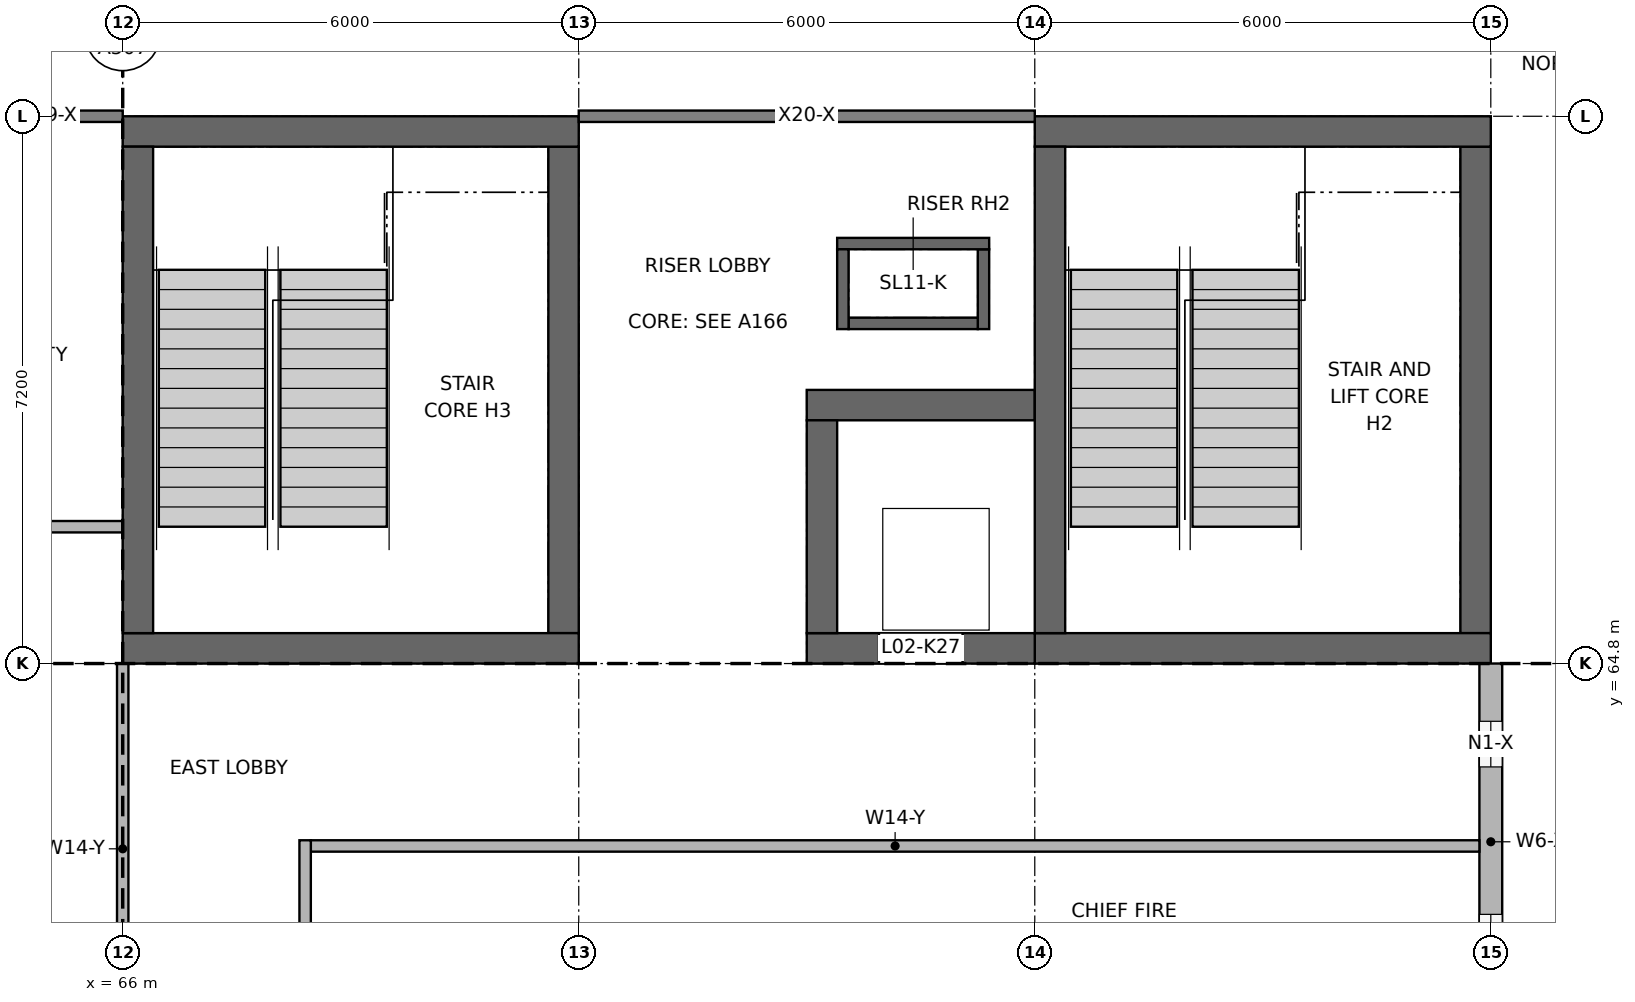
"""IFC4 building model, lengths in metres.
Left out: names, types, materials, properties, quantities, classifications, styles, units other than length and angle.
Written with IfcOpenShell. Run it as: python <this file> out.ifc"""

import sys

from ifc_helpers import new_model, si_unit, direction, frame, frame_2d, origin, place, context, subcontext, project, spatial, rectangle, extrude, element, fill, save


model = new_model("IFC4")
c1 = context("Model", 3, precision=1e-05, world=origin(), true_north=direction((0.0, 1.0)))
c2 = subcontext(c1, "Body", "Model", "MODEL_VIEW")
j1 = project(units=[si_unit("LENGTHUNIT", "METRE"), si_unit("PLANEANGLEUNIT", "RADIAN")], contexts=[c1])
p1 = place(None, origin())
s1 = spatial("IfcSite", under=j1, at=p1, CompositionType="ELEMENT")
p2 = place(p1, origin())
s2 = spatial("IfcBuilding", under=s1, at=p2, CompositionType="ELEMENT")
p3 = place(p2, frame((0.0, 0.0, 8.4)))
s3 = spatial("IfcBuildingStorey", under=s2, at=p3, CompositionType="ELEMENT", Elevation=8.4)
p4 = place(p3, frame((78.0, 65.0, 0.0), z_axis=(0.0, 0.0, 1.0), x_axis=(1.0, 0.0, 0.0)))
e1 = element("IfcWall", 1, at=p4, inside=s3, PredefinedType="SHEAR", context=c2, shape_type="SweptSolid", body=[
    extrude(rectangle(XDim=6.0, YDim=0.4, at=frame_2d((3.0, 0.0))), origin(), (0.0, 0.0, 1.0), 4.0),
])
p5 = place(p4, frame((2.4, 0.0, 0.0)))
e2 = element("IfcOpeningElement", 2, at=p5, cuts=e1, PredefinedType="OPENING", context=c2, shape_type="SweptSolid", body=[
    extrude(rectangle(XDim=1.2, YDim=2.1, at=frame_2d((0.6, 1.05))), frame((0.0, 0.21, 0.0), z_axis=(0.0, -1.0, 0.0), x_axis=(1.0, 0.0, 0.0)), (0.0, 0.0, 1.0), 0.42),
])
p6 = place(p3, frame((78.0, 71.8, 0.0), z_axis=(0.0, 0.0, 1.0), x_axis=(1.0, 0.0, 0.0)))
e3 = element("IfcWall", 3, at=p6, inside=s3, PredefinedType="SHEAR", context=c2, shape_type="SweptSolid", body=[
    extrude(rectangle(XDim=6.0, YDim=0.4, at=frame_2d((3.0, 0.0))), origin(), (0.0, 0.0, 1.0), 4.0),
])
p7 = place(p6, frame((3.7, 0.0, 0.0)))
e4 = element("IfcOpeningElement", 4, at=p7, cuts=e3, PredefinedType="OPENING", context=c2, shape_type="SweptSolid", body=[
    extrude(rectangle(XDim=1.4, YDim=2.1, at=frame_2d((0.7, 1.05))), frame((0.0, 0.21, 0.0), z_axis=(0.0, -1.0, 0.0), x_axis=(1.0, 0.0, 0.0)), (0.0, 0.0, 1.0), 0.42),
])
for number, where, z_axis, x_axis in (
    (5, (78.2, 65.2, 0.0), (0.0, 0.0, 1.0), (0.0, 1.0, 0.0)),
    (6, (83.8, 65.2, 0.0), (0.0, 0.0, 1.0), (0.0, 1.0, 0.0)),
):
    element("IfcWall", number, at=place(p3, frame(where, z_axis=z_axis, x_axis=x_axis)), inside=s3, PredefinedType="SHEAR", context=c2, shape_type="SweptSolid", body=[
        extrude(rectangle(XDim=6.4, YDim=0.4, at=frame_2d((3.2, 0.0))), origin(), (0.0, 0.0, 1.0), 4.0),
    ])
p8 = place(p3, frame((75.0, 65.0, 0.0), z_axis=(0.0, 0.0, 1.0), x_axis=(1.0, 0.0, 0.0)))
e7 = element("IfcWall", 7, at=p8, inside=s3, PredefinedType="SHEAR", context=c2, shape_type="SweptSolid", body=[
    extrude(rectangle(XDim=3.0, YDim=0.4, at=frame_2d((1.5, 0.0))), origin(), (0.0, 0.0, 1.0), 4.2),
])
p9 = place(p8, frame((0.95, 0.0, 0.0)))
e8 = element("IfcOpeningElement", 8, at=p9, cuts=e7, PredefinedType="OPENING", context=c2, shape_type="SweptSolid", body=[
    extrude(rectangle(XDim=1.1, YDim=2.1, at=frame_2d((0.55, 1.05))), frame((0.0, 0.21, 0.0), z_axis=(0.0, -1.0, 0.0), x_axis=(1.0, 0.0, 0.0)), (0.0, 0.0, 1.0), 0.42),
])
p10 = place(p3, frame((75.0, 68.2, 0.0), z_axis=(0.0, 0.0, 1.0), x_axis=(1.0, 0.0, 0.0)))
e9 = element("IfcWall", 9, at=p10, inside=s3, PredefinedType="SHEAR", context=c2, shape_type="SweptSolid", body=[
    extrude(rectangle(XDim=3.0, YDim=0.4, at=frame_2d((1.5, 0.0))), origin(), (0.0, 0.0, 1.0), 4.2),
])
p11 = place(p3, frame((75.2, 65.2, 0.0), z_axis=(0.0, 0.0, 1.0), x_axis=(0.0, 1.0, 0.0)))
e10 = element("IfcWall", 10, at=p11, inside=s3, PredefinedType="SHEAR", context=c2, shape_type="SweptSolid", body=[
    extrude(rectangle(XDim=2.8, YDim=0.4, at=frame_2d((1.4, 0.0))), origin(), (0.0, 0.0, 1.0), 4.2),
])
p12 = place(p3, frame((66.0, 65.0, 0.0), z_axis=(0.0, 0.0, 1.0), x_axis=(1.0, 0.0, 0.0)))
e11 = element("IfcWall", 11, at=p12, inside=s3, PredefinedType="SHEAR", context=c2, shape_type="SweptSolid", body=[
    extrude(rectangle(XDim=6.0, YDim=0.4, at=frame_2d((3.0, 0.0))), origin(), (0.0, 0.0, 1.0), 4.0),
])
p13 = place(p12, frame((2.4, 0.0, 0.0)))
e12 = element("IfcOpeningElement", 12, at=p13, cuts=e11, PredefinedType="OPENING", context=c2, shape_type="SweptSolid", body=[
    extrude(rectangle(XDim=1.2, YDim=2.1, at=frame_2d((0.6, 1.05))), frame((0.0, 0.21, 0.0), z_axis=(0.0, -1.0, 0.0), x_axis=(1.0, 0.0, 0.0)), (0.0, 0.0, 1.0), 0.42),
])
p14 = place(p3, frame((66.0, 71.8, 0.0), z_axis=(0.0, 0.0, 1.0), x_axis=(1.0, 0.0, 0.0)))
e13 = element("IfcWall", 13, at=p14, inside=s3, PredefinedType="SHEAR", context=c2, shape_type="SweptSolid", body=[
    extrude(rectangle(XDim=6.0, YDim=0.4, at=frame_2d((3.0, 0.0))), origin(), (0.0, 0.0, 1.0), 4.0),
])
p15 = place(p14, frame((3.7, 0.0, 0.0)))
e14 = element("IfcOpeningElement", 14, at=p15, cuts=e13, PredefinedType="OPENING", context=c2, shape_type="SweptSolid", body=[
    extrude(rectangle(XDim=1.4, YDim=2.1, at=frame_2d((0.7, 1.05))), frame((0.0, 0.21, 0.0), z_axis=(0.0, -1.0, 0.0), x_axis=(1.0, 0.0, 0.0)), (0.0, 0.0, 1.0), 0.42),
])
for number, where, z_axis, x_axis in (
    (15, (66.2, 65.2, 0.0), (0.0, 0.0, 1.0), (0.0, 1.0, 0.0)),
    (16, (71.8, 65.2, 0.0), (0.0, 0.0, 1.0), (0.0, 1.0, 0.0)),
):
    element("IfcWall", number, at=place(p3, frame(where, z_axis=z_axis, x_axis=x_axis)), inside=s3, PredefinedType="SHEAR", context=c2, shape_type="SweptSolid", body=[
        extrude(rectangle(XDim=6.4, YDim=0.4, at=frame_2d((3.2, 0.0))), origin(), (0.0, 0.0, 1.0), 4.0),
    ])
for number, where, z_axis, x_axis in (
    (17, (78.0, 65.0, -0.25), (0.0, 0.0, 1.0), (1.0, 0.0, 0.0)),
    (18, (78.0, 71.8, -0.25), (0.0, 0.0, 1.0), (1.0, 0.0, 0.0)),
):
    element("IfcWall", number, at=place(p3, frame(where, z_axis=z_axis, x_axis=x_axis)), inside=s3, PredefinedType="SOLIDWALL", context=c2, shape_type="SweptSolid", body=[
        extrude(rectangle(XDim=6.0, YDim=0.4, at=frame_2d((3.0, 0.0))), origin(), (0.0, 0.0, 1.0), 0.25),
    ])
p16 = place(p3, frame((83.8, 65.2, -0.25), z_axis=(0.0, 0.0, 1.0), x_axis=(0.0, 1.0, 0.0)))
e19 = element("IfcWall", 19, at=p16, inside=s3, PredefinedType="SOLIDWALL", context=c2, shape_type="SweptSolid", body=[
    extrude(rectangle(XDim=6.4, YDim=0.4, at=frame_2d((3.2, 0.0))), origin(), (0.0, 0.0, 1.0), 0.25),
])
for number, where, z_axis, x_axis in (
    (20, (66.0, 65.0, -0.25), (0.0, 0.0, 1.0), (1.0, 0.0, 0.0)),
    (21, (66.0, 71.8, -0.25), (0.0, 0.0, 1.0), (1.0, 0.0, 0.0)),
):
    element("IfcWall", number, at=place(p3, frame(where, z_axis=z_axis, x_axis=x_axis)), inside=s3, PredefinedType="SOLIDWALL", context=c2, shape_type="SweptSolid", body=[
        extrude(rectangle(XDim=6.0, YDim=0.4, at=frame_2d((3.0, 0.0))), origin(), (0.0, 0.0, 1.0), 0.25),
    ])
for number, where, z_axis, x_axis in (
    (22, (66.2, 65.2, -0.25), (0.0, 0.0, 1.0), (0.0, 1.0, 0.0)),
    (23, (71.8, 65.2, -0.25), (0.0, 0.0, 1.0), (0.0, 1.0, 0.0)),
):
    element("IfcWall", number, at=place(p3, frame(where, z_axis=z_axis, x_axis=x_axis)), inside=s3, PredefinedType="SOLIDWALL", context=c2, shape_type="SweptSolid", body=[
        extrude(rectangle(XDim=6.4, YDim=0.4, at=frame_2d((3.2, 0.0))), origin(), (0.0, 0.0, 1.0), 0.25),
    ])
p17 = place(p3, frame((75.4, 69.275, 0.0), z_axis=(0.0, 0.0, 1.0), x_axis=(1.0, 0.0, 0.0)))
e24 = element("IfcWall", 24, at=p17, inside=s3, PredefinedType="SOLIDWALL", context=c2, shape_type="SweptSolid", body=[
    extrude(rectangle(XDim=2.0, YDim=0.15, at=frame_2d((1.0, 0.0))), origin(), (0.0, 0.0, 1.0), 4.2),
])
p18 = place(p3, frame((75.4, 70.325, 0.0), z_axis=(0.0, 0.0, 1.0), x_axis=(1.0, 0.0, 0.0)))
e25 = element("IfcWall", 25, at=p18, inside=s3, PredefinedType="SOLIDWALL", context=c2, shape_type="SweptSolid", body=[
    extrude(rectangle(XDim=2.0, YDim=0.15, at=frame_2d((1.0, 0.0))), origin(), (0.0, 0.0, 1.0), 4.2),
])
p19 = place(p18, frame((0.6, 0.0, 0.0)))
e26 = element("IfcOpeningElement", 26, at=p19, cuts=e25, PredefinedType="OPENING", context=c2, shape_type="SweptSolid", body=[
    extrude(rectangle(XDim=0.8, YDim=2.1, at=frame_2d((0.4, 1.05))), frame((0.0, 0.085, 0.0), z_axis=(0.0, -1.0, 0.0), x_axis=(1.0, 0.0, 0.0)), (0.0, 0.0, 1.0), 0.17),
])
for number, where, z_axis, x_axis in (
    (27, (75.475, 69.35, 0.0), (0.0, 0.0, 1.0), (0.0, 1.0, 0.0)),
    (28, (77.325, 69.35, 0.0), (0.0, 0.0, 1.0), (0.0, 1.0, 0.0)),
):
    element("IfcWall", number, at=place(p3, frame(where, z_axis=z_axis, x_axis=x_axis)), inside=s3, PredefinedType="SOLIDWALL", context=c2, shape_type="SweptSolid", body=[
        extrude(rectangle(XDim=0.9, YDim=0.15, at=frame_2d((0.45, 0.0))), origin(), (0.0, 0.0, 1.0), 4.2),
    ])
p20 = place(p3, frame((75.55, 69.275, -0.25), z_axis=(0.0, 0.0, 1.0), x_axis=(1.0, 0.0, 0.0)))
e29 = element("IfcWall", 29, at=p20, inside=s3, PredefinedType="SOLIDWALL", context=c2, shape_type="SweptSolid", body=[
    extrude(rectangle(XDim=1.7, YDim=0.15, at=frame_2d((0.85, 0.0))), origin(), (0.0, 0.0, 1.0), 0.25),
])
p21 = place(p3, frame((75.4, 70.325, -0.25), z_axis=(0.0, 0.0, 1.0), x_axis=(1.0, 0.0, 0.0)))
e30 = element("IfcWall", 30, at=p21, inside=s3, PredefinedType="SOLIDWALL", context=c2, shape_type="SweptSolid", body=[
    extrude(rectangle(XDim=2.0, YDim=0.15, at=frame_2d((1.0, 0.0))), origin(), (0.0, 0.0, 1.0), 0.25),
])
for number, where, z_axis, x_axis in (
    (31, (75.475, 69.2, -0.25), (0.0, 0.0, 1.0), (0.0, 1.0, 0.0)),
    (32, (77.325, 69.2, -0.25), (0.0, 0.0, 1.0), (0.0, 1.0, 0.0)),
):
    element("IfcWall", number, at=place(p3, frame(where, z_axis=z_axis, x_axis=x_axis)), inside=s3, PredefinedType="SOLIDWALL", context=c2, shape_type="SweptSolid", body=[
        extrude(rectangle(XDim=1.05, YDim=0.15, at=frame_2d((0.525, 0.0))), origin(), (0.0, 0.0, 1.0), 0.25),
    ])
p22 = place(p3, frame((84.0, 58.1, 0.0), z_axis=(0.0, 0.0, 1.0), x_axis=(0.0, 1.0, 0.0)))
e33 = element("IfcWall", 33, at=p22, inside=s3, PredefinedType="SOLIDWALL", context=c2, shape_type="SweptSolid", body=[
    extrude(rectangle(XDim=6.7, YDim=0.3, at=frame_2d((3.35, 0.0))), origin(), (0.0, 0.0, 1.0), 3.1),
])
p23 = place(p22, frame((0.51, 0.0, 0.9)))
e34 = element("IfcOpeningElement", 34, at=p23, cuts=e33, PredefinedType="OPENING", context=c2, shape_type="SweptSolid", body=[
    extrude(rectangle(XDim=0.6, YDim=1.9, at=frame_2d((0.3, 0.95))), frame((0.0, 0.16, 0.0), z_axis=(0.0, -1.0, 0.0), x_axis=(1.0, 0.0, 0.0)), (0.0, 0.0, 1.0), 0.32),
])
p24 = place(p22, frame((2.8, 0.0, 0.9)))
e35 = element("IfcOpeningElement", 35, at=p24, cuts=e33, PredefinedType="OPENING", context=c2, shape_type="SweptSolid", body=[
    extrude(rectangle(XDim=0.6, YDim=1.9, at=frame_2d((0.3, 0.95))), frame((0.0, 0.16, 0.0), z_axis=(0.0, -1.0, 0.0), x_axis=(1.0, 0.0, 0.0)), (0.0, 0.0, 1.0), 0.32),
])
p25 = place(p22, frame((5.34, 0.0, 0.9)))
e36 = element("IfcOpeningElement", 36, at=p25, cuts=e33, PredefinedType="OPENING", context=c2, shape_type="SweptSolid", body=[
    extrude(rectangle(XDim=0.6, YDim=1.9, at=frame_2d((0.3, 0.95))), frame((0.0, 0.16, 0.0), z_axis=(0.0, -1.0, 0.0), x_axis=(1.0, 0.0, 0.0)), (0.0, 0.0, 1.0), 0.32),
])
p26 = place(p3, frame((66.0, 59.925, 0.0), z_axis=(0.0, 0.0, 1.0), x_axis=(0.0, 1.0, 0.0)))
e37 = element("IfcWall", 37, at=p26, inside=s3, PredefinedType="PARTITIONING", context=c2, shape_type="SweptSolid", body=[
    extrude(rectangle(XDim=4.875, YDim=0.15, at=frame_2d((2.438, 0.0))), origin(), (0.0, 0.0, 1.0), 4.0),
])
p27 = place(p3, frame((68.4, 59.925, 0.0), z_axis=(0.0, 0.0, 1.0), x_axis=(0.0, 1.0, 0.0)))
e38 = element("IfcWall", 38, at=p27, inside=s3, PredefinedType="PARTITIONING", context=c2, shape_type="SweptSolid", body=[
    extrude(rectangle(XDim=2.55, YDim=0.15, at=frame_2d((1.275, 0.0))), origin(), (0.0, 0.0, 1.0), 4.0),
])
p28 = place(p3, frame((68.475, 62.4, 0.0), z_axis=(0.0, 0.0, 1.0), x_axis=(1.0, 0.0, 0.0)))
e39 = element("IfcWall", 39, at=p28, inside=s3, PredefinedType="PARTITIONING", context=c2, shape_type="SweptSolid", body=[
    extrude(rectangle(XDim=15.375, YDim=0.15, at=frame_2d((7.688, 0.0))), origin(), (0.0, 0.0, 1.0), 4.0),
])
p29 = place(p3, frame((50.475, 66.6, 0.0), z_axis=(0.0, 0.0, 1.0), x_axis=(1.0, 0.0, 0.0)))
e40 = element("IfcWall", 40, at=p29, inside=s3, PredefinedType="PARTITIONING", context=c2, shape_type="SweptSolid", body=[
    extrude(rectangle(XDim=15.525, YDim=0.15, at=frame_2d((7.762, 0.0))), origin(), (0.0, 0.0, 1.0), 3.1),
])
p30 = place(p24, origin())
e41 = element("IfcWindow", 41, at=p30, inside=s3, PartitioningType="SINGLE_PANEL", PredefinedType="WINDOW", context=c2, shape_type="SweptSolid", body=[
    extrude(rectangle(XDim=0.6, YDim=1.9, at=frame_2d((0.3, 0.95))), frame((0.0, 0.03, 0.0), z_axis=(0.0, -1.0, 0.0), x_axis=(1.0, 0.0, 0.0)), (0.0, 0.0, 1.0), 0.06),
])
fill(e35, e41)
p31 = place(p25, origin())
e42 = element("IfcWindow", 42, at=p31, inside=s3, PartitioningType="SINGLE_PANEL", PredefinedType="WINDOW", context=c2, shape_type="SweptSolid", body=[
    extrude(rectangle(XDim=0.6, YDim=1.9, at=frame_2d((0.3, 0.95))), frame((0.0, 0.03, 0.0), z_axis=(0.0, -1.0, 0.0), x_axis=(1.0, 0.0, 0.0)), (0.0, 0.0, 1.0), 0.06),
])
fill(e36, e42)
p32 = place(p5, origin())
e43 = element("IfcDoor", 43, at=p32, inside=s3, OperationType="SINGLE_SWING_LEFT", PredefinedType="DOOR", context=c2, shape_type="SweptSolid", body=[
    extrude(rectangle(XDim=1.2, YDim=2.1, at=frame_2d((0.6, 1.05))), frame((0.0, 0.025, 0.0), z_axis=(0.0, -1.0, 0.0), x_axis=(1.0, 0.0, 0.0)), (0.0, 0.0, 1.0), 0.05),
])
fill(e2, e43)
p33 = place(p7, origin())
e44 = element("IfcDoor", 44, at=p33, inside=s3, OperationType="DOUBLE_DOOR_SINGLE_SWING", PredefinedType="DOOR", context=c2, shape_type="SweptSolid", body=[
    extrude(rectangle(XDim=1.4, YDim=2.1, at=frame_2d((0.7, 1.05))), frame((0.0, 0.025, 0.0), z_axis=(0.0, -1.0, 0.0), x_axis=(1.0, 0.0, 0.0)), (0.0, 0.0, 1.0), 0.05),
])
fill(e4, e44)
p34 = place(p9, origin())
e45 = element("IfcDoor", 45, at=p34, inside=s3, OperationType="DOUBLE_DOOR_SLIDING", PredefinedType="DOOR", context=c2, shape_type="SweptSolid", body=[
    extrude(rectangle(XDim=1.1, YDim=2.1, at=frame_2d((0.55, 1.05))), frame((0.0, 0.025, 0.0), z_axis=(0.0, -1.0, 0.0), x_axis=(1.0, 0.0, 0.0)), (0.0, 0.0, 1.0), 0.05),
])
fill(e8, e45)
p35 = place(p19, frame((0.8, 0.0, 0.0), z_axis=(0.0, 0.0, 1.0), x_axis=(-1.0, 0.0, 0.0)))
e46 = element("IfcDoor", 46, at=p35, inside=s3, OperationType="SINGLE_SWING_LEFT", PredefinedType="DOOR", context=c2, shape_type="SweptSolid", body=[
    extrude(rectangle(XDim=0.8, YDim=2.1, at=frame_2d((0.4, 1.05))), frame((0.0, 0.025, 0.0), z_axis=(0.0, -1.0, 0.0), x_axis=(1.0, 0.0, 0.0)), (0.0, 0.0, 1.0), 0.05),
])
fill(e26, e46)
p36 = place(p13, origin())
e47 = element("IfcDoor", 47, at=p36, inside=s3, OperationType="SINGLE_SWING_LEFT", PredefinedType="DOOR", context=c2, shape_type="SweptSolid", body=[
    extrude(rectangle(XDim=1.2, YDim=2.1, at=frame_2d((0.6, 1.05))), frame((0.0, 0.025, 0.0), z_axis=(0.0, -1.0, 0.0), x_axis=(1.0, 0.0, 0.0)), (0.0, 0.0, 1.0), 0.05),
])
fill(e12, e47)
p37 = place(p15, origin())
e48 = element("IfcDoor", 48, at=p37, inside=s3, OperationType="DOUBLE_DOOR_SINGLE_SWING", PredefinedType="DOOR", context=c2, shape_type="SweptSolid", body=[
    extrude(rectangle(XDim=1.4, YDim=2.1, at=frame_2d((0.7, 1.05))), frame((0.0, 0.025, 0.0), z_axis=(0.0, -1.0, 0.0), x_axis=(1.0, 0.0, 0.0)), (0.0, 0.0, 1.0), 0.05),
])
fill(e14, e48)
save(model, sys.argv[1])
